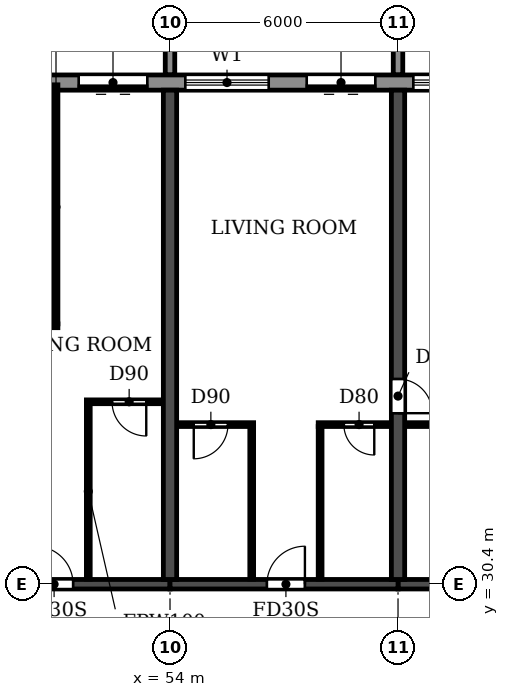
"""IFC4 building model, lengths in metres.
Left out: names, types, materials, properties, quantities, classifications, styles, units other than length and angle.
Written with IfcOpenShell. Run it as: python <this file> out.ifc"""

import sys

from ifc_helpers import new_model, si_unit, direction, frame, frame_2d, origin, place, context, subcontext, project, spatial, polyline, rectangle, outline, extrude, source, transform, mapped, element, fill, save


model = new_model("IFC4")
c1 = context("Model", 3, precision=1e-05, world=origin(), true_north=direction((0.0, 1.0)))
c2 = subcontext(c1, "Body", "Model", "MODEL_VIEW")
j1 = project(units=[si_unit("LENGTHUNIT", "METRE"), si_unit("PLANEANGLEUNIT", "RADIAN")], contexts=[c1])
p1 = place(None, origin())
s1 = spatial("IfcSite", under=j1, at=p1, CompositionType="ELEMENT")
p2 = place(p1, origin())
s2 = spatial("IfcBuilding", under=s1, at=p2, CompositionType="ELEMENT")
p3 = place(p2, frame((0.0, 0.0, 72.9)))
s3 = spatial("IfcBuildingStorey", under=s2, at=p3, CompositionType="ELEMENT", Elevation=72.9)
p4 = place(p3, frame((54.0, 30.525, 0.0), z_axis=(0.0, 0.0, 1.0), x_axis=(0.0, 1.0, 0.0)))
e1 = element("IfcWall", 1, at=p4, inside=s3, PredefinedType="SHEAR", context=c2, shape_type="SweptSolid", body=[
    extrude(rectangle(XDim=12.875, YDim=0.35, at=frame_2d((6.438, 0.0))), origin(), (0.0, 0.0, 1.0), 3.06),
])
p5 = place(p3, frame((60.0, 30.525, 0.0), z_axis=(0.0, 0.0, 1.0), x_axis=(0.0, 1.0, 0.0)))
e2 = element("IfcWall", 2, at=p5, inside=s3, PredefinedType="SHEAR", context=c2, shape_type="SweptSolid", body=[
    extrude(rectangle(XDim=12.875, YDim=0.35, at=frame_2d((6.438, 0.0))), origin(), (0.0, 0.0, 1.0), 3.06),
])
p6 = place(p5, frame((4.375, 0.0, 0.0)))
e3 = element("IfcOpeningElement", 3, at=p6, cuts=e2, PredefinedType="OPENING", context=c2, shape_type="SweptSolid", body=[
    extrude(rectangle(XDim=0.9, YDim=2.1, at=frame_2d((0.45, 1.05))), frame((0.0, 0.185, 0.0), z_axis=(0.0, -1.0, 0.0), x_axis=(1.0, 0.0, 0.0)), (0.0, 0.0, 1.0), 0.37),
])
p7 = place(p3, frame((48.0, 30.4, 0.0), z_axis=(0.0, 0.0, 1.0), x_axis=(1.0, 0.0, 0.0)))
e4 = element("IfcWall", 4, at=p7, inside=s3, PredefinedType="SHEAR", context=c2, shape_type="SweptSolid", body=[
    extrude(rectangle(XDim=6.0, YDim=0.25, at=frame_2d((3.0, 0.0))), origin(), (0.0, 0.0, 1.0), 2.46),
])
p8 = place(p7, frame((2.45, 0.0, 0.0)))
e5 = element("IfcOpeningElement", 5, at=p8, cuts=e4, PredefinedType="OPENING", context=c2, shape_type="SweptSolid", body=[
    extrude(rectangle(XDim=1.0, YDim=2.1, at=frame_2d((0.5, 1.05))), frame((0.0, 0.135, 0.0), z_axis=(0.0, -1.0, 0.0), x_axis=(1.0, 0.0, 0.0)), (0.0, 0.0, 1.0), 0.27),
])
p9 = place(p3, frame((54.0, 30.4, 0.0), z_axis=(0.0, 0.0, 1.0), x_axis=(1.0, 0.0, 0.0)))
e6 = element("IfcWall", 6, at=p9, inside=s3, PredefinedType="SHEAR", context=c2, shape_type="SweptSolid", body=[
    extrude(rectangle(XDim=6.0, YDim=0.25, at=frame_2d((3.0, 0.0))), origin(), (0.0, 0.0, 1.0), 2.46),
])
p10 = place(p9, frame((2.55, 0.0, 0.0)))
e7 = element("IfcOpeningElement", 7, at=p10, cuts=e6, PredefinedType="OPENING", context=c2, shape_type="SweptSolid", body=[
    extrude(rectangle(XDim=1.0, YDim=2.1, at=frame_2d((0.5, 1.05))), frame((0.0, 0.135, 0.0), z_axis=(0.0, -1.0, 0.0), x_axis=(1.0, 0.0, 0.0)), (0.0, 0.0, 1.0), 0.27),
])
p11 = place(p3, frame((60.0, 30.4, 0.0), z_axis=(0.0, 0.0, 1.0), x_axis=(1.0, 0.0, 0.0)))
e8 = element("IfcWall", 8, at=p11, inside=s3, PredefinedType="SHEAR", context=c2, shape_type="SweptSolid", body=[
    extrude(rectangle(XDim=6.0, YDim=0.25, at=frame_2d((3.0, 0.0))), origin(), (0.0, 0.0, 1.0), 2.46),
])
p12 = place(p3, frame((91.317, 43.6, 0.0), z_axis=(0.0, 0.0, 1.0), x_axis=(-1.0, 0.0, 0.0)))
e9 = element("IfcWall", 9, at=p12, inside=s3, PredefinedType="STANDARD", context=c2, shape_type="SweptSolid", body=[
    extrude(rectangle(XDim=80.634, YDim=0.4, at=frame_2d((40.317, 0.0))), origin(), (0.0, 0.0, 1.0), 3.06),
])
p13 = place(p12, frame((76.717, 0.0, 0.9)))
e10 = element("IfcOpeningElement", 10, at=p13, cuts=e9, PredefinedType="OPENING", context=c2, shape_type="SweptSolid", body=[
    extrude(rectangle(XDim=2.2, YDim=1.5, at=frame_2d((1.1, 0.75))), frame((0.0, 0.21, 0.0), z_axis=(0.0, -1.0, 0.0), x_axis=(1.0, 0.0, 0.0)), (0.0, 0.0, 1.0), 0.42),
])
p14 = place(p12, frame((73.917, 0.0, 0.0)))
e11 = element("IfcOpeningElement", 11, at=p14, cuts=e9, PredefinedType="OPENING", context=c2, shape_type="SweptSolid", body=[
    extrude(rectangle(XDim=1.8, YDim=2.4, at=frame_2d((0.9, 1.2))), frame((0.0, 0.21, 0.0), z_axis=(0.0, -1.0, 0.0), x_axis=(1.0, 0.0, 0.0)), (0.0, 0.0, 1.0), 0.42),
])
p15 = place(p12, frame((70.917, 0.0, 0.0)))
e12 = element("IfcOpeningElement", 12, at=p15, cuts=e9, PredefinedType="OPENING", context=c2, shape_type="SweptSolid", body=[
    extrude(rectangle(XDim=1.8, YDim=2.4, at=frame_2d((0.9, 1.2))), frame((0.0, 0.21, 0.0), z_axis=(0.0, -1.0, 0.0), x_axis=(1.0, 0.0, 0.0)), (0.0, 0.0, 1.0), 0.42),
])
p16 = place(p12, frame((67.717, 0.0, 0.9)))
e13 = element("IfcOpeningElement", 13, at=p16, cuts=e9, PredefinedType="OPENING", context=c2, shape_type="SweptSolid", body=[
    extrude(rectangle(XDim=2.2, YDim=1.5, at=frame_2d((1.1, 0.75))), frame((0.0, 0.21, 0.0), z_axis=(0.0, -1.0, 0.0), x_axis=(1.0, 0.0, 0.0)), (0.0, 0.0, 1.0), 0.42),
])
p17 = place(p12, frame((64.717, 0.0, 0.9)))
e14 = element("IfcOpeningElement", 14, at=p17, cuts=e9, PredefinedType="OPENING", context=c2, shape_type="SweptSolid", body=[
    extrude(rectangle(XDim=2.2, YDim=1.5, at=frame_2d((1.1, 0.75))), frame((0.0, 0.21, 0.0), z_axis=(0.0, -1.0, 0.0), x_axis=(1.0, 0.0, 0.0)), (0.0, 0.0, 1.0), 0.42),
])
p18 = place(p12, frame((61.917, 0.0, 0.0)))
e15 = element("IfcOpeningElement", 15, at=p18, cuts=e9, PredefinedType="OPENING", context=c2, shape_type="SweptSolid", body=[
    extrude(rectangle(XDim=1.8, YDim=2.4, at=frame_2d((0.9, 1.2))), frame((0.0, 0.21, 0.0), z_axis=(0.0, -1.0, 0.0), x_axis=(1.0, 0.0, 0.0)), (0.0, 0.0, 1.0), 0.42),
])
p19 = place(p12, frame((58.717, 0.0, 0.9)))
e16 = element("IfcOpeningElement", 16, at=p19, cuts=e9, PredefinedType="OPENING", context=c2, shape_type="SweptSolid", body=[
    extrude(rectangle(XDim=2.2, YDim=1.5, at=frame_2d((1.1, 0.75))), frame((0.0, 0.21, 0.0), z_axis=(0.0, -1.0, 0.0), x_axis=(1.0, 0.0, 0.0)), (0.0, 0.0, 1.0), 0.42),
])
p20 = place(p12, frame((55.917, 0.0, 0.0)))
e17 = element("IfcOpeningElement", 17, at=p20, cuts=e9, PredefinedType="OPENING", context=c2, shape_type="SweptSolid", body=[
    extrude(rectangle(XDim=1.8, YDim=2.4, at=frame_2d((0.9, 1.2))), frame((0.0, 0.21, 0.0), z_axis=(0.0, -1.0, 0.0), x_axis=(1.0, 0.0, 0.0)), (0.0, 0.0, 1.0), 0.42),
])
p21 = place(p12, frame((52.717, 0.0, 0.9)))
e18 = element("IfcOpeningElement", 18, at=p21, cuts=e9, PredefinedType="OPENING", context=c2, shape_type="SweptSolid", body=[
    extrude(rectangle(XDim=2.2, YDim=1.5, at=frame_2d((1.1, 0.75))), frame((0.0, 0.21, 0.0), z_axis=(0.0, -1.0, 0.0), x_axis=(1.0, 0.0, 0.0)), (0.0, 0.0, 1.0), 0.42),
])
p22 = place(p12, frame((49.717, 0.0, 0.9)))
e19 = element("IfcOpeningElement", 19, at=p22, cuts=e9, PredefinedType="OPENING", context=c2, shape_type="SweptSolid", body=[
    extrude(rectangle(XDim=2.2, YDim=1.5, at=frame_2d((1.1, 0.75))), frame((0.0, 0.21, 0.0), z_axis=(0.0, -1.0, 0.0), x_axis=(1.0, 0.0, 0.0)), (0.0, 0.0, 1.0), 0.42),
])
p23 = place(p12, frame((46.917, 0.0, 0.0)))
e20 = element("IfcOpeningElement", 20, at=p23, cuts=e9, PredefinedType="OPENING", context=c2, shape_type="SweptSolid", body=[
    extrude(rectangle(XDim=1.8, YDim=2.4, at=frame_2d((0.9, 1.2))), frame((0.0, 0.21, 0.0), z_axis=(0.0, -1.0, 0.0), x_axis=(1.0, 0.0, 0.0)), (0.0, 0.0, 1.0), 0.42),
])
p24 = place(p12, frame((43.717, 0.0, 0.9)))
e21 = element("IfcOpeningElement", 21, at=p24, cuts=e9, PredefinedType="OPENING", context=c2, shape_type="SweptSolid", body=[
    extrude(rectangle(XDim=2.2, YDim=1.5, at=frame_2d((1.1, 0.75))), frame((0.0, 0.21, 0.0), z_axis=(0.0, -1.0, 0.0), x_axis=(1.0, 0.0, 0.0)), (0.0, 0.0, 1.0), 0.42),
])
p25 = place(p12, frame((40.717, 0.0, 0.9)))
e22 = element("IfcOpeningElement", 22, at=p25, cuts=e9, PredefinedType="OPENING", context=c2, shape_type="SweptSolid", body=[
    extrude(rectangle(XDim=2.2, YDim=1.5, at=frame_2d((1.1, 0.75))), frame((0.0, 0.21, 0.0), z_axis=(0.0, -1.0, 0.0), x_axis=(1.0, 0.0, 0.0)), (0.0, 0.0, 1.0), 0.42),
])
p26 = place(p12, frame((37.917, 0.0, 0.0)))
e23 = element("IfcOpeningElement", 23, at=p26, cuts=e9, PredefinedType="OPENING", context=c2, shape_type="SweptSolid", body=[
    extrude(rectangle(XDim=1.8, YDim=2.4, at=frame_2d((0.9, 1.2))), frame((0.0, 0.21, 0.0), z_axis=(0.0, -1.0, 0.0), x_axis=(1.0, 0.0, 0.0)), (0.0, 0.0, 1.0), 0.42),
])
p27 = place(p12, frame((34.717, 0.0, 0.9)))
e24 = element("IfcOpeningElement", 24, at=p27, cuts=e9, PredefinedType="OPENING", context=c2, shape_type="SweptSolid", body=[
    extrude(rectangle(XDim=2.2, YDim=1.5, at=frame_2d((1.1, 0.75))), frame((0.0, 0.21, 0.0), z_axis=(0.0, -1.0, 0.0), x_axis=(1.0, 0.0, 0.0)), (0.0, 0.0, 1.0), 0.42),
])
p28 = place(p12, frame((31.917, 0.0, 0.0)))
e25 = element("IfcOpeningElement", 25, at=p28, cuts=e9, PredefinedType="OPENING", context=c2, shape_type="SweptSolid", body=[
    extrude(rectangle(XDim=1.8, YDim=2.4, at=frame_2d((0.9, 1.2))), frame((0.0, 0.21, 0.0), z_axis=(0.0, -1.0, 0.0), x_axis=(1.0, 0.0, 0.0)), (0.0, 0.0, 1.0), 0.42),
])
p29 = place(p12, frame((28.717, 0.0, 0.9)))
e26 = element("IfcOpeningElement", 26, at=p29, cuts=e9, PredefinedType="OPENING", context=c2, shape_type="SweptSolid", body=[
    extrude(rectangle(XDim=2.2, YDim=1.5, at=frame_2d((1.1, 0.75))), frame((0.0, 0.21, 0.0), z_axis=(0.0, -1.0, 0.0), x_axis=(1.0, 0.0, 0.0)), (0.0, 0.0, 1.0), 0.42),
])
p30 = place(p12, frame((25.717, 0.0, 0.9)))
e27 = element("IfcOpeningElement", 27, at=p30, cuts=e9, PredefinedType="OPENING", context=c2, shape_type="SweptSolid", body=[
    extrude(rectangle(XDim=2.2, YDim=1.5, at=frame_2d((1.1, 0.75))), frame((0.0, 0.21, 0.0), z_axis=(0.0, -1.0, 0.0), x_axis=(1.0, 0.0, 0.0)), (0.0, 0.0, 1.0), 0.42),
])
p31 = place(p12, frame((22.717, 0.0, 0.9)))
e28 = element("IfcOpeningElement", 28, at=p31, cuts=e9, PredefinedType="OPENING", context=c2, shape_type="SweptSolid", body=[
    extrude(rectangle(XDim=2.2, YDim=1.5, at=frame_2d((1.1, 0.75))), frame((0.0, 0.21, 0.0), z_axis=(0.0, -1.0, 0.0), x_axis=(1.0, 0.0, 0.0)), (0.0, 0.0, 1.0), 0.42),
])
p32 = place(p12, frame((19.917, 0.0, 0.0)))
e29 = element("IfcOpeningElement", 29, at=p32, cuts=e9, PredefinedType="OPENING", context=c2, shape_type="SweptSolid", body=[
    extrude(rectangle(XDim=1.8, YDim=2.4, at=frame_2d((0.9, 1.2))), frame((0.0, 0.21, 0.0), z_axis=(0.0, -1.0, 0.0), x_axis=(1.0, 0.0, 0.0)), (0.0, 0.0, 1.0), 0.42),
])
p33 = place(p12, frame((16.717, 0.0, 0.9)))
e30 = element("IfcOpeningElement", 30, at=p33, cuts=e9, PredefinedType="OPENING", context=c2, shape_type="SweptSolid", body=[
    extrude(rectangle(XDim=2.2, YDim=1.5, at=frame_2d((1.1, 0.75))), frame((0.0, 0.21, 0.0), z_axis=(0.0, -1.0, 0.0), x_axis=(1.0, 0.0, 0.0)), (0.0, 0.0, 1.0), 0.42),
])
p34 = place(p12, frame((13.717, 0.0, 0.9)))
e31 = element("IfcOpeningElement", 31, at=p34, cuts=e9, PredefinedType="OPENING", context=c2, shape_type="SweptSolid", body=[
    extrude(rectangle(XDim=2.2, YDim=1.5, at=frame_2d((1.1, 0.75))), frame((0.0, 0.21, 0.0), z_axis=(0.0, -1.0, 0.0), x_axis=(1.0, 0.0, 0.0)), (0.0, 0.0, 1.0), 0.42),
])
p35 = place(p12, frame((10.717, 0.0, 0.9)))
e32 = element("IfcOpeningElement", 32, at=p35, cuts=e9, PredefinedType="OPENING", context=c2, shape_type="SweptSolid", body=[
    extrude(rectangle(XDim=2.2, YDim=1.5, at=frame_2d((1.1, 0.75))), frame((0.0, 0.21, 0.0), z_axis=(0.0, -1.0, 0.0), x_axis=(1.0, 0.0, 0.0)), (0.0, 0.0, 1.0), 0.42),
])
p36 = place(p12, frame((7.917, 0.0, 0.0)))
e33 = element("IfcOpeningElement", 33, at=p36, cuts=e9, PredefinedType="OPENING", context=c2, shape_type="SweptSolid", body=[
    extrude(rectangle(XDim=1.8, YDim=2.4, at=frame_2d((0.9, 1.2))), frame((0.0, 0.21, 0.0), z_axis=(0.0, -1.0, 0.0), x_axis=(1.0, 0.0, 0.0)), (0.0, 0.0, 1.0), 0.42),
])
p37 = place(p12, frame((4.717, 0.0, 0.9)))
e34 = element("IfcOpeningElement", 34, at=p37, cuts=e9, PredefinedType="OPENING", context=c2, shape_type="SweptSolid", body=[
    extrude(rectangle(XDim=2.2, YDim=1.5, at=frame_2d((1.1, 0.75))), frame((0.0, 0.21, 0.0), z_axis=(0.0, -1.0, 0.0), x_axis=(1.0, 0.0, 0.0)), (0.0, 0.0, 1.0), 0.42),
])
p38 = place(p12, frame((1.917, 0.0, 0.0)))
e35 = element("IfcOpeningElement", 35, at=p38, cuts=e9, PredefinedType="OPENING", context=c2, shape_type="SweptSolid", body=[
    extrude(rectangle(XDim=1.8, YDim=2.4, at=frame_2d((0.9, 1.2))), frame((0.0, 0.21, 0.0), z_axis=(0.0, -1.0, 0.0), x_axis=(1.0, 0.0, 0.0)), (0.0, 0.0, 1.0), 0.42),
])
m1 = source(origin(), c2, "Body", "SweptSolid", [
    extrude(outline(polyline([(0.0, 0.0), (0.25, 0.0), (0.25, 3.1), (0.0, 3.1), (0.0, 0.0)])), origin(), (0.0, 0.0, 1.0), 3.1),
])
for number, where in (
    (36, (53.875, 43.8, 0.0)),
    (37, (59.875, 43.8, 0.0)),
):
    element("IfcWall", number, at=place(p3, frame(where)), inside=s3, PredefinedType="STANDARD", context=c2, shape_type="MappedRepresentation", body=[
        mapped(m1, transform((0.0, 0.0, 0.0))),
    ])
p39 = place(p3, frame((54.185, 34.6, 0.0), z_axis=(0.0, 0.0, 1.0), x_axis=(1.0, 0.0, 0.0)))
e38 = element("IfcWall", 38, at=p39, inside=s3, PredefinedType="PARTITIONING", context=c2, shape_type="SweptSolid", body=[
    extrude(rectangle(XDim=2.015, YDim=0.1, at=frame_2d((1.007, 0.0))), origin(), (0.0, 0.0, 1.0), 3.06),
])
p40 = place(p39, frame((0.44, 0.0, 0.0)))
e39 = element("IfcOpeningElement", 39, at=p40, cuts=e38, PredefinedType="OPENING", context=c2, shape_type="SweptSolid", body=[
    extrude(rectangle(XDim=0.9, YDim=2.1, at=frame_2d((0.45, 1.05))), frame((0.0, 0.06, 0.0), z_axis=(0.0, -1.0, 0.0), x_axis=(1.0, 0.0, 0.0)), (0.0, 0.0, 1.0), 0.12),
])
p41 = place(p3, frame((57.9, 34.6, 0.0), z_axis=(0.0, 0.0, 1.0), x_axis=(1.0, 0.0, 0.0)))
e40 = element("IfcWall", 40, at=p41, inside=s3, PredefinedType="PARTITIONING", context=c2, shape_type="SweptSolid", body=[
    extrude(rectangle(XDim=1.915, YDim=0.1, at=frame_2d((0.958, 0.0))), origin(), (0.0, 0.0, 1.0), 3.06),
])
p42 = place(p41, frame((0.675, 0.0, 0.0)))
e41 = element("IfcOpeningElement", 41, at=p42, cuts=e40, PredefinedType="OPENING", context=c2, shape_type="SweptSolid", body=[
    extrude(rectangle(XDim=0.8, YDim=2.1, at=frame_2d((0.4, 1.05))), frame((0.0, 0.06, 0.0), z_axis=(0.0, -1.0, 0.0), x_axis=(1.0, 0.0, 0.0)), (0.0, 0.0, 1.0), 0.12),
])
p43 = place(p3, frame((60.185, 34.6, 0.0), z_axis=(0.0, 0.0, 1.0), x_axis=(1.0, 0.0, 0.0)))
e42 = element("IfcWall", 42, at=p43, inside=s3, PredefinedType="PARTITIONING", context=c2, shape_type="SweptSolid", body=[
    extrude(rectangle(XDim=2.715, YDim=0.1, at=frame_2d((1.357, 0.0))), origin(), (0.0, 0.0, 1.0), 3.06),
])
p44 = place(p43, frame((0.915, 0.0, 0.0)))
e43 = element("IfcOpeningElement", 43, at=p44, cuts=e42, PredefinedType="OPENING", context=c2, shape_type="SweptSolid", body=[
    extrude(rectangle(XDim=0.8, YDim=2.1, at=frame_2d((0.4, 1.05))), frame((0.0, 0.06, 0.0), z_axis=(0.0, -1.0, 0.0), x_axis=(1.0, 0.0, 0.0)), (0.0, 0.0, 1.0), 0.12),
])
p45 = place(p3, frame((51.8, 35.2, 0.0), z_axis=(0.0, 0.0, 1.0), x_axis=(1.0, 0.0, 0.0)))
e44 = element("IfcWall", 44, at=p45, inside=s3, PredefinedType="PARTITIONING", context=c2, shape_type="SweptSolid", body=[
    extrude(rectangle(XDim=2.015, YDim=0.1, at=frame_2d((1.007, 0.0))), origin(), (0.0, 0.0, 1.0), 3.06),
])
p46 = place(p45, frame((0.675, 0.0, 0.0)))
e45 = element("IfcOpeningElement", 45, at=p46, cuts=e44, PredefinedType="OPENING", context=c2, shape_type="SweptSolid", body=[
    extrude(rectangle(XDim=0.9, YDim=2.1, at=frame_2d((0.45, 1.05))), frame((0.0, 0.06, 0.0), z_axis=(0.0, -1.0, 0.0), x_axis=(1.0, 0.0, 0.0)), (0.0, 0.0, 1.0), 0.12),
])
p47 = place(p3, frame((48.185, 37.2, 0.0), z_axis=(0.0, 0.0, 1.0), x_axis=(1.0, 0.0, 0.0)))
e46 = element("IfcWall", 46, at=p47, inside=s3, PredefinedType="PARTITIONING", context=c2, shape_type="SweptSolid", body=[
    extrude(rectangle(XDim=2.865, YDim=0.1, at=frame_2d((1.433, 0.0))), origin(), (0.0, 0.0, 1.0), 3.06),
])
p48 = place(p47, frame((0.315, 0.0, 0.0)))
e47 = element("IfcOpeningElement", 47, at=p48, cuts=e46, PredefinedType="OPENING", context=c2, shape_type="SweptSolid", body=[
    extrude(rectangle(XDim=0.9, YDim=2.1, at=frame_2d((0.45, 1.05))), frame((0.0, 0.06, 0.0), z_axis=(0.0, -1.0, 0.0), x_axis=(1.0, 0.0, 0.0)), (0.0, 0.0, 1.0), 0.12),
])
p49 = place(p3, frame((51.0, 37.25, 0.0), z_axis=(0.0, 0.0, 1.0), x_axis=(0.0, 1.0, 0.0)))
e48 = element("IfcWall", 48, at=p49, inside=s3, PredefinedType="PARTITIONING", context=c2, shape_type="SweptSolid", body=[
    extrude(rectangle(XDim=6.29, YDim=0.1, at=frame_2d((3.145, 0.0))), origin(), (0.0, 0.0, 1.0), 3.06),
])
p50 = place(p3, frame((51.85, 30.535, 0.0), z_axis=(0.0, 0.0, 1.0), x_axis=(0.0, 1.0, 0.0)))
e49 = element("IfcWall", 49, at=p50, inside=s3, PredefinedType="PARTITIONING", context=c2, shape_type="SweptSolid", body=[
    extrude(rectangle(XDim=4.615, YDim=0.1, at=frame_2d((2.308, 0.0))), origin(), (0.0, 0.0, 1.0), 3.06),
])
for number, where, z_axis, x_axis in (
    (50, (56.15, 30.535, 0.0), (0.0, 0.0, 1.0), (0.0, 1.0, 0.0)),
    (51, (57.95, 30.535, 0.0), (0.0, 0.0, 1.0), (0.0, 1.0, 0.0)),
):
    element("IfcWall", number, at=place(p3, frame(where, z_axis=z_axis, x_axis=x_axis)), inside=s3, PredefinedType="PARTITIONING", context=c2, shape_type="SweptSolid", body=[
        extrude(rectangle(XDim=4.015, YDim=0.1, at=frame_2d((2.008, 0.0))), origin(), (0.0, 0.0, 1.0), 3.06),
    ])
p51 = place(p26, origin())
e52 = element("IfcDoor", 52, at=p51, inside=s3, OperationType="DOUBLE_DOOR_SLIDING", PredefinedType="DOOR", context=c2, shape_type="SweptSolid", body=[
    extrude(rectangle(XDim=1.8, YDim=2.4, at=frame_2d((0.9, 1.2))), frame((0.0, 0.025, 0.0), z_axis=(0.0, -1.0, 0.0), x_axis=(1.0, 0.0, 0.0)), (0.0, 0.0, 1.0), 0.05),
])
fill(e23, e52)
p52 = place(p27, origin())
e53 = element("IfcWindow", 53, at=p52, inside=s3, PartitioningType="DOUBLE_PANEL_HORIZONTAL", PredefinedType="WINDOW", context=c2, shape_type="SweptSolid", body=[
    extrude(rectangle(XDim=2.2, YDim=1.5, at=frame_2d((1.1, 0.75))), frame((0.0, 0.03, 0.0), z_axis=(0.0, -1.0, 0.0), x_axis=(1.0, 0.0, 0.0)), (0.0, 0.0, 1.0), 0.06),
])
fill(e24, e53)
p53 = place(p28, origin())
e54 = element("IfcDoor", 54, at=p53, inside=s3, OperationType="DOUBLE_DOOR_SLIDING", PredefinedType="DOOR", context=c2, shape_type="SweptSolid", body=[
    extrude(rectangle(XDim=1.8, YDim=2.4, at=frame_2d((0.9, 1.2))), frame((0.0, 0.025, 0.0), z_axis=(0.0, -1.0, 0.0), x_axis=(1.0, 0.0, 0.0)), (0.0, 0.0, 1.0), 0.05),
])
fill(e25, e54)
p54 = place(p29, origin())
e55 = element("IfcWindow", 55, at=p54, inside=s3, PartitioningType="DOUBLE_PANEL_HORIZONTAL", PredefinedType="WINDOW", context=c2, shape_type="SweptSolid", body=[
    extrude(rectangle(XDim=2.2, YDim=1.5, at=frame_2d((1.1, 0.75))), frame((0.0, 0.03, 0.0), z_axis=(0.0, -1.0, 0.0), x_axis=(1.0, 0.0, 0.0)), (0.0, 0.0, 1.0), 0.06),
])
fill(e26, e55)
p55 = place(p8, origin())
e56 = element("IfcDoor", 56, at=p55, inside=s3, OperationType="SINGLE_SWING_LEFT", PredefinedType="DOOR", context=c2, shape_type="SweptSolid", body=[
    extrude(rectangle(XDim=1.0, YDim=2.1, at=frame_2d((0.5, 1.05))), frame((0.0, 0.025, 0.0), z_axis=(0.0, -1.0, 0.0), x_axis=(1.0, 0.0, 0.0)), (0.0, 0.0, 1.0), 0.05),
])
fill(e5, e56)
p56 = place(p46, frame((0.9, 0.0, 0.0), z_axis=(0.0, 0.0, 1.0), x_axis=(-1.0, 0.0, 0.0)))
e57 = element("IfcDoor", 57, at=p56, inside=s3, OperationType="SINGLE_SWING_LEFT", PredefinedType="DOOR", context=c2, shape_type="SweptSolid", body=[
    extrude(rectangle(XDim=0.9, YDim=2.1, at=frame_2d((0.45, 1.05))), frame((0.0, 0.025, 0.0), z_axis=(0.0, -1.0, 0.0), x_axis=(1.0, 0.0, 0.0)), (0.0, 0.0, 1.0), 0.05),
])
fill(e45, e57)
p57 = place(p40, frame((0.9, 0.0, 0.0), z_axis=(0.0, 0.0, 1.0), x_axis=(-1.0, 0.0, 0.0)))
e58 = element("IfcDoor", 58, at=p57, inside=s3, OperationType="SINGLE_SWING_RIGHT", PredefinedType="DOOR", context=c2, shape_type="SweptSolid", body=[
    extrude(rectangle(XDim=0.9, YDim=2.1, at=frame_2d((0.45, 1.05))), frame((0.0, 0.025, 0.0), z_axis=(0.0, -1.0, 0.0), x_axis=(1.0, 0.0, 0.0)), (0.0, 0.0, 1.0), 0.05),
])
fill(e39, e58)
p58 = place(p10, origin())
e59 = element("IfcDoor", 59, at=p58, inside=s3, OperationType="SINGLE_SWING_RIGHT", PredefinedType="DOOR", context=c2, shape_type="SweptSolid", body=[
    extrude(rectangle(XDim=1.0, YDim=2.1, at=frame_2d((0.5, 1.05))), frame((0.0, 0.025, 0.0), z_axis=(0.0, -1.0, 0.0), x_axis=(1.0, 0.0, 0.0)), (0.0, 0.0, 1.0), 0.05),
])
fill(e7, e59)
p59 = place(p42, frame((0.8, 0.0, 0.0), z_axis=(0.0, 0.0, 1.0), x_axis=(-1.0, 0.0, 0.0)))
e60 = element("IfcDoor", 60, at=p59, inside=s3, OperationType="SINGLE_SWING_LEFT", PredefinedType="DOOR", context=c2, shape_type="SweptSolid", body=[
    extrude(rectangle(XDim=0.8, YDim=2.1, at=frame_2d((0.4, 1.05))), frame((0.0, 0.025, 0.0), z_axis=(0.0, -1.0, 0.0), x_axis=(1.0, 0.0, 0.0)), (0.0, 0.0, 1.0), 0.05),
])
fill(e41, e60)
p60 = place(p6, frame((0.9, 0.0, 0.0), z_axis=(0.0, 0.0, 1.0), x_axis=(-1.0, 0.0, 0.0)))
e61 = element("IfcDoor", 61, at=p60, inside=s3, OperationType="SINGLE_SWING_RIGHT", PredefinedType="DOOR", context=c2, shape_type="SweptSolid", body=[
    extrude(rectangle(XDim=0.9, YDim=2.1, at=frame_2d((0.45, 1.05))), frame((0.0, 0.025, 0.0), z_axis=(0.0, -1.0, 0.0), x_axis=(1.0, 0.0, 0.0)), (0.0, 0.0, 1.0), 0.05),
])
fill(e3, e61)
save(model, sys.argv[1])
